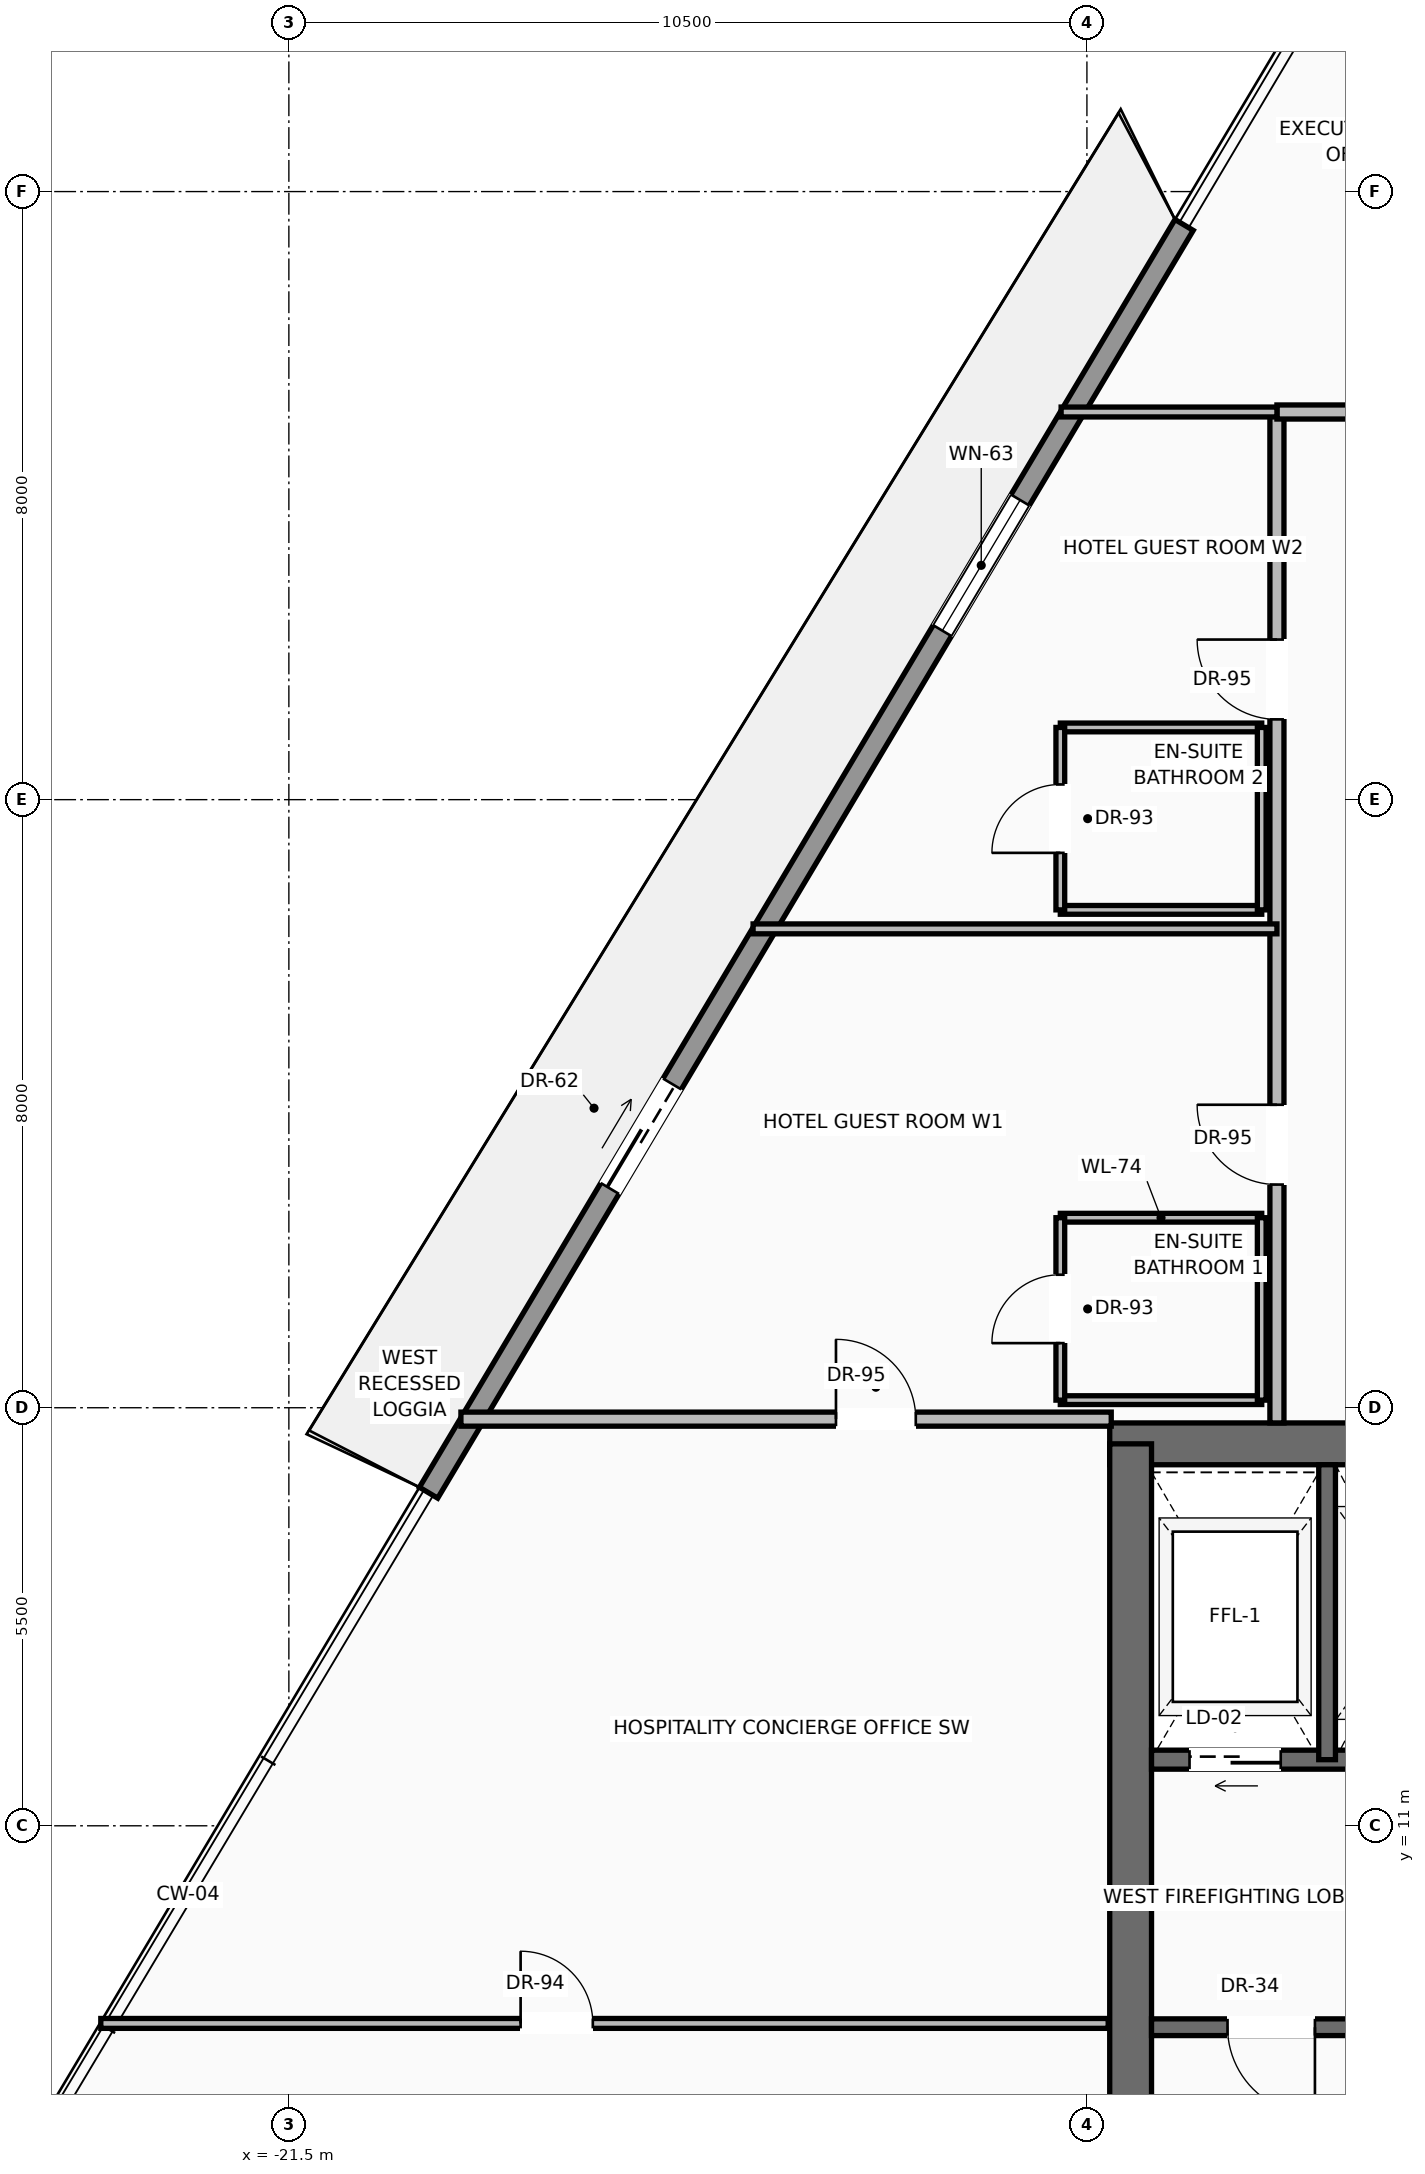
"""IFC4 building model, lengths in metres.
Left out: names, types, materials, properties, quantities, classifications, styles, units other than length and angle.
Written with IfcOpenShell. Run it as: python <this file> out.ifc"""

import sys

from ifc_helpers import new_model, si_unit, direction, frame, frame_2d, origin, place, context, subcontext, project, spatial, rectangle, extrude, source, transform, mapped, element, fill, save


model = new_model("IFC4")
c1 = context("Model", 3, precision=1e-05, world=origin(), true_north=direction((0.0, 1.0)))
c2 = subcontext(c1, "Body", "Model", "MODEL_VIEW")
j1 = project(units=[si_unit("LENGTHUNIT", "METRE"), si_unit("PLANEANGLEUNIT", "RADIAN")], contexts=[c1])
p1 = place(None, origin())
s1 = spatial("IfcSite", under=j1, at=p1, CompositionType="ELEMENT")
p2 = place(p1, origin())
s2 = spatial("IfcBuilding", under=s1, at=p2, CompositionType="ELEMENT")
p3 = place(p2, frame((0.0, 0.0, 226.9)))
s3 = spatial("IfcBuildingStorey", under=s2, at=p3, CompositionType="ELEMENT", Elevation=226.9)
p4 = place(p3, frame((-10.7, 16.025, 0.0), z_axis=(0.0, 0.0, 1.0), x_axis=(1.0, 0.0, 0.0)))
e1 = element("IfcWall", 1, at=p4, inside=s3, PredefinedType="SHEAR", context=c2, shape_type="SweptSolid", body=[
    extrude(rectangle(XDim=21.4, YDim=0.55, at=frame_2d((10.7, 0.0))), origin(), (0.0, 0.0, 1.0), 3.24),
])
p5 = place(p4, frame((3.27, 0.0, 0.0)))
e2 = element("IfcOpeningElement", 2, at=p5, cuts=e1, PredefinedType="OPENING", context=c2, shape_type="SweptSolid", body=[
    extrude(rectangle(XDim=1.3, YDim=2.3, at=frame_2d((0.65, 1.15))), frame((0.0, 0.285, 0.0), z_axis=(0.0, -1.0, 0.0), x_axis=(1.0, 0.0, 0.0)), (0.0, 0.0, 1.0), 0.57),
])
p6 = place(p4, frame((9.7, 0.0, 0.0)))
e3 = element("IfcOpeningElement", 3, at=p6, cuts=e1, PredefinedType="OPENING", context=c2, shape_type="SweptSolid", body=[
    extrude(rectangle(XDim=2.0, YDim=2.4, at=frame_2d((1.0, 1.2))), frame((0.0, 0.285, 0.0), z_axis=(0.0, -1.0, 0.0), x_axis=(1.0, 0.0, 0.0)), (0.0, 0.0, 1.0), 0.57),
])
p7 = place(p3, frame((-10.425, 0.575, 0.0), z_axis=(0.0, 0.0, 1.0), x_axis=(0.0, 1.0, 0.0)))
e4 = element("IfcWall", 4, at=p7, inside=s3, PredefinedType="SHEAR", context=c2, shape_type="SweptSolid", body=[
    extrude(rectangle(XDim=15.45, YDim=0.55, at=frame_2d((7.725, 0.0))), origin(), (0.0, 0.0, 1.0), 3.24),
])
p8 = place(p3, frame((-19.662, 15.382, 0.0), z_axis=(0.0, 0.0, 1.0), x_axis=(0.511952859747, 0.859013544361, 0.0)))
e5 = element("IfcWall", 5, at=p8, inside=s3, PredefinedType="SOLIDWALL", context=c2, shape_type="SweptSolid", body=[
    extrude(rectangle(XDim=19.417, YDim=0.28, at=frame_2d((9.708, 0.0))), origin(), (0.0, 0.0, 1.0), 2.82),
])
p9 = place(p8, frame((4.66, 0.0, 0.0)))
e6 = element("IfcOpeningElement", 6, at=p9, cuts=e5, PredefinedType="OPENING", context=c2, shape_type="SweptSolid", body=[
    extrude(rectangle(XDim=1.6, YDim=2.35, at=frame_2d((0.8, 1.175))), frame((0.0, 0.15, 0.0), z_axis=(0.0, -1.0, 0.0), x_axis=(1.0, 0.0, 0.0)), (0.0, 0.0, 1.0), 0.3),
])
p10 = place(p8, frame((13.203, 0.0, 0.9)))
e7 = element("IfcOpeningElement", 7, at=p10, cuts=e5, PredefinedType="OPENING", context=c2, shape_type="SweptSolid", body=[
    extrude(rectangle(XDim=2.0, YDim=1.75, at=frame_2d((1.0, 0.875))), frame((0.0, 0.15, 0.0), z_axis=(0.0, -1.0, 0.0), x_axis=(1.0, 0.0, 0.0)), (0.0, 0.0, 1.0), 0.3),
])
p11 = place(p3, frame((-5.5, 8.35, 0.0), z_axis=(0.0, 0.0, 1.0), x_axis=(-1.0, 0.0, 0.0)))
e8 = element("IfcWall", 8, at=p11, inside=s3, PredefinedType="SOLIDWALL", context=c2, shape_type="SweptSolid", body=[
    extrude(rectangle(XDim=4.65, YDim=0.22, at=frame_2d((2.325, 0.0))), origin(), (0.0, 0.0, 1.0), 3.24),
])
p12 = place(p11, frame((2.5, 0.0, 0.0)))
e9 = element("IfcOpeningElement", 9, at=p12, cuts=e8, PredefinedType="OPENING", context=c2, shape_type="SweptSolid", body=[
    extrude(rectangle(XDim=1.15, YDim=2.2, at=frame_2d((0.575, 1.1))), frame((0.0, 0.12, 0.0), z_axis=(0.0, -1.0, 0.0), x_axis=(1.0, 0.0, 0.0)), (0.0, 0.0, 1.0), 0.24),
])
p13 = place(p3, frame((-5.5, 11.87, 0.0), z_axis=(0.0, 0.0, 1.0), x_axis=(-1.0, 0.0, 0.0)))
e10 = element("IfcWall", 10, at=p13, inside=s3, PredefinedType="SOLIDWALL", context=c2, shape_type="SweptSolid", body=[
    extrude(rectangle(XDim=4.65, YDim=0.25, at=frame_2d((2.325, 0.0))), origin(), (0.0, 0.0, 1.0), 3.24),
])
p14 = place(p13, frame((2.95, 0.0, 0.0)))
e11 = element("IfcOpeningElement", 11, at=p14, cuts=e10, PredefinedType="OPENING", context=c2, shape_type="SweptSolid", body=[
    extrude(rectangle(XDim=1.2, YDim=2.25, at=frame_2d((0.6, 1.125))), frame((0.0, 0.135, 0.0), z_axis=(0.0, -1.0, 0.0), x_axis=(1.0, 0.0, 0.0)), (0.0, 0.0, 1.0), 0.27),
])
p15 = place(p3, frame((-7.84, 11.87, 0.0), z_axis=(0.0, 0.0, 1.0), x_axis=(0.0, 1.0, 0.0)))
e12 = element("IfcWall", 12, at=p15, inside=s3, PredefinedType="SOLIDWALL", context=c2, shape_type="SweptSolid", body=[
    extrude(rectangle(XDim=3.88, YDim=0.22, at=frame_2d((1.94, 0.0))), origin(), (0.0, 0.0, 1.0), 3.24),
])
p16 = place(p3, frame((-8.5, 16.3, 0.0), z_axis=(0.0, 0.0, 1.0), x_axis=(0.0, 1.0, 0.0)))
e13 = element("IfcWall", 13, at=p16, inside=s3, PredefinedType="PARTITIONING", context=c2, shape_type="SweptSolid", body=[
    extrude(rectangle(XDim=13.3, YDim=0.185, at=frame_2d((6.65, 0.0))), origin(), (0.0, 0.0, 1.0), 3.232),
])
p17 = place(p16, frame((3.136, 0.0, 0.0)))
e14 = element("IfcOpeningElement", 14, at=p17, cuts=e13, PredefinedType="OPENING", context=c2, shape_type="SweptSolid", body=[
    extrude(rectangle(XDim=1.05, YDim=2.25, at=frame_2d((0.525, 1.125))), frame((0.0, 0.103, 0.0), z_axis=(0.0, -1.0, 0.0), x_axis=(1.0, 0.0, 0.0)), (0.0, 0.0, 1.0), 0.205),
])
p18 = place(p16, frame((9.256, 0.0, 0.0)))
e15 = element("IfcOpeningElement", 15, at=p18, cuts=e13, PredefinedType="OPENING", context=c2, shape_type="SweptSolid", body=[
    extrude(rectangle(XDim=1.05, YDim=2.25, at=frame_2d((0.525, 1.125))), frame((0.0, 0.103, 0.0), z_axis=(0.0, -1.0, 0.0), x_axis=(1.0, 0.0, 0.0)), (0.0, 0.0, 1.0), 0.205),
])
p19 = place(p3, frame((-8.5, 29.6, 0.0), z_axis=(0.0, 0.0, 1.0), x_axis=(1.0, 0.0, 0.0)))
e16 = element("IfcWall", 16, at=p19, inside=s3, PredefinedType="PARTITIONING", context=c2, shape_type="SweptSolid", body=[
    extrude(rectangle(XDim=17.0, YDim=0.185, at=frame_2d((8.5, 0.0))), origin(), (0.0, 0.0, 1.0), 3.232),
])
p20 = place(p19, frame((3.698, 0.0, 0.0)))
e17 = element("IfcOpeningElement", 17, at=p20, cuts=e16, PredefinedType="OPENING", context=c2, shape_type="SweptSolid", body=[
    extrude(rectangle(XDim=1.05, YDim=2.25, at=frame_2d((0.525, 1.125))), frame((0.0, 0.103, 0.0), z_axis=(0.0, -1.0, 0.0), x_axis=(1.0, 0.0, 0.0)), (0.0, 0.0, 1.0), 0.205),
])
p21 = place(p19, frame((7.975, 0.0, 0.0)))
e18 = element("IfcOpeningElement", 18, at=p21, cuts=e16, PredefinedType="OPENING", context=c2, shape_type="SweptSolid", body=[
    extrude(rectangle(XDim=1.05, YDim=2.25, at=frame_2d((0.525, 1.125))), frame((0.0, 0.103, 0.0), z_axis=(0.0, -1.0, 0.0), x_axis=(1.0, 0.0, 0.0)), (0.0, 0.0, 1.0), 0.205),
])
p22 = place(p19, frame((12.252, 0.0, 0.0)))
e19 = element("IfcOpeningElement", 19, at=p22, cuts=e16, PredefinedType="OPENING", context=c2, shape_type="SweptSolid", body=[
    extrude(rectangle(XDim=1.05, YDim=2.25, at=frame_2d((0.525, 1.125))), frame((0.0, 0.103, 0.0), z_axis=(0.0, -1.0, 0.0), x_axis=(1.0, 0.0, 0.0)), (0.0, 0.0, 1.0), 0.205),
])
p23 = place(p19, frame((14.698, 0.0, 0.0)))
e20 = element("IfcOpeningElement", 20, at=p23, cuts=e16, PredefinedType="OPENING", context=c2, shape_type="SweptSolid", body=[
    extrude(rectangle(XDim=1.05, YDim=2.25, at=frame_2d((0.525, 1.125))), frame((0.0, 0.103, 0.0), z_axis=(0.0, -1.0, 0.0), x_axis=(1.0, 0.0, 0.0)), (0.0, 0.0, 1.0), 0.205),
])
p24 = place(p19, frame((1.252, 0.0, 0.0)))
e21 = element("IfcOpeningElement", 21, at=p24, cuts=e16, PredefinedType="OPENING", context=c2, shape_type="SweptSolid", body=[
    extrude(rectangle(XDim=1.05, YDim=2.25, at=frame_2d((0.525, 1.125))), frame((0.0, 0.103, 0.0), z_axis=(0.0, -1.0, 0.0), x_axis=(1.0, 0.0, 0.0)), (0.0, 0.0, 1.0), 0.205),
])
p25 = place(p3, frame((-19.236, 16.35, 0.0), z_axis=(0.0, 0.0, 1.0), x_axis=(1.0, 0.0, 0.0)))
e22 = element("IfcWall", 22, at=p25, inside=s3, PredefinedType="PARTITIONING", context=c2, shape_type="SweptSolid", body=[
    extrude(rectangle(XDim=8.556, YDim=0.185, at=frame_2d((4.278, 0.0))), origin(), (0.0, 0.0, 1.0), 3.232),
])
p26 = place(p25, frame((4.935, 0.0, 0.0)))
e23 = element("IfcOpeningElement", 23, at=p26, cuts=e22, PredefinedType="OPENING", context=c2, shape_type="SweptSolid", body=[
    extrude(rectangle(XDim=1.05, YDim=2.25, at=frame_2d((0.525, 1.125))), frame((0.0, 0.103, 0.0), z_axis=(0.0, -1.0, 0.0), x_axis=(1.0, 0.0, 0.0)), (0.0, 0.0, 1.0), 0.205),
])
p27 = place(p3, frame((-11.339, 29.6, 0.0), z_axis=(0.0, 0.0, 1.0), x_axis=(1.0, 0.0, 0.0)))
e24 = element("IfcWall", 24, at=p27, inside=s3, PredefinedType="PARTITIONING", context=c2, shape_type="SweptSolid", body=[
    extrude(rectangle(XDim=2.839, YDim=0.13, at=frame_2d((1.42, 0.0))), origin(), (0.0, 0.0, 1.0), 3.232),
])
p28 = place(p3, frame((-23.974, 8.4, 0.0), z_axis=(0.0, 0.0, 1.0), x_axis=(1.0, 0.0, 0.0)))
e25 = element("IfcWall", 25, at=p28, inside=s3, PredefinedType="PARTITIONING", context=c2, shape_type="SweptSolid", body=[
    extrude(rectangle(XDim=13.254, YDim=0.13, at=frame_2d((6.627, 0.0))), origin(), (0.0, 0.0, 1.0), 3.232),
])
p29 = place(p28, frame((5.523, 0.0, 0.0)))
e26 = element("IfcOpeningElement", 26, at=p29, cuts=e25, PredefinedType="OPENING", context=c2, shape_type="SweptSolid", body=[
    extrude(rectangle(XDim=0.95, YDim=2.2, at=frame_2d((0.475, 1.1))), frame((0.0, 0.075, 0.0), z_axis=(0.0, -1.0, 0.0), x_axis=(1.0, 0.0, 0.0)), (0.0, 0.0, 1.0), 0.15),
])
for number, where, z_axis, x_axis in (
    (27, (-11.35, 16.6, 0.0), (0.0, 0.0, 1.0), (1.0, 0.0, 0.0)),
    (28, (-11.35, 19.0, 0.0), (0.0, 0.0, 1.0), (1.0, 0.0, 0.0)),
):
    element("IfcWall", number, at=place(p3, frame(where, z_axis=z_axis, x_axis=x_axis)), inside=s3, PredefinedType="PARTITIONING", context=c2, shape_type="SweptSolid", body=[
        extrude(rectangle(XDim=2.65, YDim=0.115, at=frame_2d((1.325, 0.0))), origin(), (0.0, 0.0, 1.0), 3.232),
    ])
p30 = place(p3, frame((-11.35, 16.6, 0.0), z_axis=(0.0, 0.0, 1.0), x_axis=(0.0, 1.0, 0.0)))
e29 = element("IfcWall", 29, at=p30, inside=s3, PredefinedType="PARTITIONING", context=c2, shape_type="SweptSolid", body=[
    extrude(rectangle(XDim=2.4, YDim=0.115, at=frame_2d((1.2, 0.0))), origin(), (0.0, 0.0, 1.0), 3.232),
])
p31 = place(p30, frame((0.75, 0.0, 0.0)))
e30 = element("IfcOpeningElement", 30, at=p31, cuts=e29, PredefinedType="OPENING", context=c2, shape_type="SweptSolid", body=[
    extrude(rectangle(XDim=0.9, YDim=2.15, at=frame_2d((0.45, 1.075))), frame((0.0, 0.067, 0.0), z_axis=(0.0, -1.0, 0.0), x_axis=(1.0, 0.0, 0.0)), (0.0, 0.0, 1.0), 0.135),
])
p32 = place(p3, frame((-8.7, 16.6, 0.0), z_axis=(0.0, 0.0, 1.0), x_axis=(0.0, 1.0, 0.0)))
e31 = element("IfcWall", 31, at=p32, inside=s3, PredefinedType="PARTITIONING", context=c2, shape_type="SweptSolid", body=[
    extrude(rectangle(XDim=2.4, YDim=0.115, at=frame_2d((1.2, 0.0))), origin(), (0.0, 0.0, 1.0), 3.232),
])
p33 = place(p3, frame((-15.392, 22.8, 0.0), z_axis=(0.0, 0.0, 1.0), x_axis=(1.0, 0.0, 0.0)))
e32 = element("IfcWall", 32, at=p33, inside=s3, PredefinedType="PARTITIONING", context=c2, shape_type="SweptSolid", body=[
    extrude(rectangle(XDim=6.892, YDim=0.13, at=frame_2d((3.446, 0.0))), origin(), (0.0, 0.0, 1.0), 3.232),
])
for number, where, z_axis, x_axis in (
    (33, (-11.35, 23.05, 0.0), (0.0, 0.0, 1.0), (1.0, 0.0, 0.0)),
    (34, (-11.35, 25.45, 0.0), (0.0, 0.0, 1.0), (1.0, 0.0, 0.0)),
):
    element("IfcWall", number, at=place(p3, frame(where, z_axis=z_axis, x_axis=x_axis)), inside=s3, PredefinedType="PARTITIONING", context=c2, shape_type="SweptSolid", body=[
        extrude(rectangle(XDim=2.65, YDim=0.115, at=frame_2d((1.325, 0.0))), origin(), (0.0, 0.0, 1.0), 3.232),
    ])
p34 = place(p3, frame((-11.35, 23.05, 0.0), z_axis=(0.0, 0.0, 1.0), x_axis=(0.0, 1.0, 0.0)))
e35 = element("IfcWall", 35, at=p34, inside=s3, PredefinedType="PARTITIONING", context=c2, shape_type="SweptSolid", body=[
    extrude(rectangle(XDim=2.4, YDim=0.115, at=frame_2d((1.2, 0.0))), origin(), (0.0, 0.0, 1.0), 3.232),
])
p35 = place(p34, frame((0.75, 0.0, 0.0)))
e36 = element("IfcOpeningElement", 36, at=p35, cuts=e35, PredefinedType="OPENING", context=c2, shape_type="SweptSolid", body=[
    extrude(rectangle(XDim=0.9, YDim=2.15, at=frame_2d((0.45, 1.075))), frame((0.0, 0.067, 0.0), z_axis=(0.0, -1.0, 0.0), x_axis=(1.0, 0.0, 0.0)), (0.0, 0.0, 1.0), 0.135),
])
p36 = place(p3, frame((-8.7, 23.05, 0.0), z_axis=(0.0, 0.0, 1.0), x_axis=(0.0, 1.0, 0.0)))
e37 = element("IfcWall", 37, at=p36, inside=s3, PredefinedType="PARTITIONING", context=c2, shape_type="SweptSolid", body=[
    extrude(rectangle(XDim=2.4, YDim=0.115, at=frame_2d((1.2, 0.0))), origin(), (0.0, 0.0, 1.0), 3.232),
])
m1 = source(origin(), c2, "Body", "SweptSolid", [
    extrude(rectangle(XDim=1.6, YDim=2.35, at=frame_2d((0.8, 1.175))), frame((0.0, 0.025, 0.0), z_axis=(0.0, -1.0, 0.0), x_axis=(1.0, 0.0, 0.0)), (0.0, 0.0, 1.0), 0.05),
])
p37 = place(p9, origin())
e38 = element("IfcDoor", 38, at=p37, inside=s3, OperationType="SLIDING_TO_LEFT", PredefinedType="DOOR", context=c2, shape_type="MappedRepresentation", body=[
    mapped(m1, transform((0.0, 0.0, 0.0), scale=1.0)),
])
fill(e6, e38)
m2 = source(origin(), c2, "Body", "SweptSolid", [
    extrude(rectangle(XDim=2.0, YDim=1.75, at=frame_2d((1.0, 0.875))), frame((0.0, 0.03, 0.0), z_axis=(0.0, -1.0, 0.0), x_axis=(1.0, 0.0, 0.0)), (0.0, 0.0, 1.0), 0.06),
])
p38 = place(p10, origin())
e39 = element("IfcWindow", 39, at=p38, inside=s3, PartitioningType="SINGLE_PANEL", PredefinedType="WINDOW", context=c2, shape_type="MappedRepresentation", body=[
    mapped(m2, transform((0.0, 0.0, 0.0), scale=1.0)),
])
fill(e7, e39)
m3 = source(origin(), c2, "Body", "SweptSolid", [
    extrude(rectangle(XDim=1.15, YDim=2.2, at=frame_2d((0.575, 1.1))), frame((0.0, 0.025, 0.0), z_axis=(0.0, -1.0, 0.0), x_axis=(1.0, 0.0, 0.0)), (0.0, 0.0, 1.0), 0.05),
])
p39 = place(p12, origin())
e40 = element("IfcDoor", 40, at=p39, inside=s3, OperationType="SINGLE_SWING_LEFT", PredefinedType="DOOR", context=c2, shape_type="MappedRepresentation", body=[
    mapped(m3, transform((0.0, 0.0, 0.0), scale=1.0)),
])
fill(e9, e40)
m4 = source(origin(), c2, "Body", "SweptSolid", [
    extrude(rectangle(XDim=1.2, YDim=2.25, at=frame_2d((0.6, 1.125))), frame((0.0, 0.025, 0.0), z_axis=(0.0, -1.0, 0.0), x_axis=(1.0, 0.0, 0.0)), (0.0, 0.0, 1.0), 0.05),
])
p40 = place(p14, origin())
e41 = element("IfcDoor", 41, at=p40, inside=s3, OperationType="SLIDING_TO_LEFT", PredefinedType="DOOR", context=c2, shape_type="MappedRepresentation", body=[
    mapped(m4, transform((0.0, 0.0, 0.0), scale=1.0)),
])
fill(e11, e41)
m5 = source(origin(), c2, "Body", "SweptSolid", [
    extrude(rectangle(XDim=1.05, YDim=2.25, at=frame_2d((0.525, 1.125))), frame((0.0, 0.025, 0.0), z_axis=(0.0, -1.0, 0.0), x_axis=(1.0, 0.0, 0.0)), (0.0, 0.0, 1.0), 0.05),
])
p41 = place(p26, origin())
e42 = element("IfcDoor", 42, at=p41, inside=s3, OperationType="SINGLE_SWING_LEFT", PredefinedType="DOOR", context=c2, shape_type="MappedRepresentation", body=[
    mapped(m5, transform((0.0, 0.0, 0.0), scale=1.0)),
])
fill(e23, e42)
m6 = source(origin(), c2, "Body", "SweptSolid", [
    extrude(rectangle(XDim=0.95, YDim=2.2, at=frame_2d((0.475, 1.1))), frame((0.0, 0.025, 0.0), z_axis=(0.0, -1.0, 0.0), x_axis=(1.0, 0.0, 0.0)), (0.0, 0.0, 1.0), 0.05),
])
p42 = place(p29, origin())
e43 = element("IfcDoor", 43, at=p42, inside=s3, OperationType="SINGLE_SWING_LEFT", PredefinedType="DOOR", context=c2, shape_type="MappedRepresentation", body=[
    mapped(m6, transform((0.0, 0.0, 0.0), scale=1.0)),
])
fill(e26, e43)
p43 = place(p17, origin())
e44 = element("IfcDoor", 44, at=p43, inside=s3, OperationType="SINGLE_SWING_RIGHT", PredefinedType="DOOR", context=c2, shape_type="MappedRepresentation", body=[
    mapped(m5, transform((0.0, 0.0, 0.0), scale=1.0)),
])
fill(e14, e44)
m7 = source(origin(), c2, "Body", "SweptSolid", [
    extrude(rectangle(XDim=0.9, YDim=2.15, at=frame_2d((0.45, 1.075))), frame((0.0, 0.025, 0.0), z_axis=(0.0, -1.0, 0.0), x_axis=(1.0, 0.0, 0.0)), (0.0, 0.0, 1.0), 0.05),
])
p44 = place(p31, origin())
e45 = element("IfcDoor", 45, at=p44, inside=s3, OperationType="SINGLE_SWING_LEFT", PredefinedType="DOOR", context=c2, shape_type="MappedRepresentation", body=[
    mapped(m7, transform((0.0, 0.0, 0.0), scale=1.0)),
])
fill(e30, e45)
p45 = place(p18, origin())
e46 = element("IfcDoor", 46, at=p45, inside=s3, OperationType="SINGLE_SWING_RIGHT", PredefinedType="DOOR", context=c2, shape_type="MappedRepresentation", body=[
    mapped(m5, transform((0.0, 0.0, 0.0), scale=1.0)),
])
fill(e15, e46)
p46 = place(p35, origin())
e47 = element("IfcDoor", 47, at=p46, inside=s3, OperationType="SINGLE_SWING_LEFT", PredefinedType="DOOR", context=c2, shape_type="MappedRepresentation", body=[
    mapped(m7, transform((0.0, 0.0, 0.0), scale=1.0)),
])
fill(e36, e47)
save(model, sys.argv[1])
